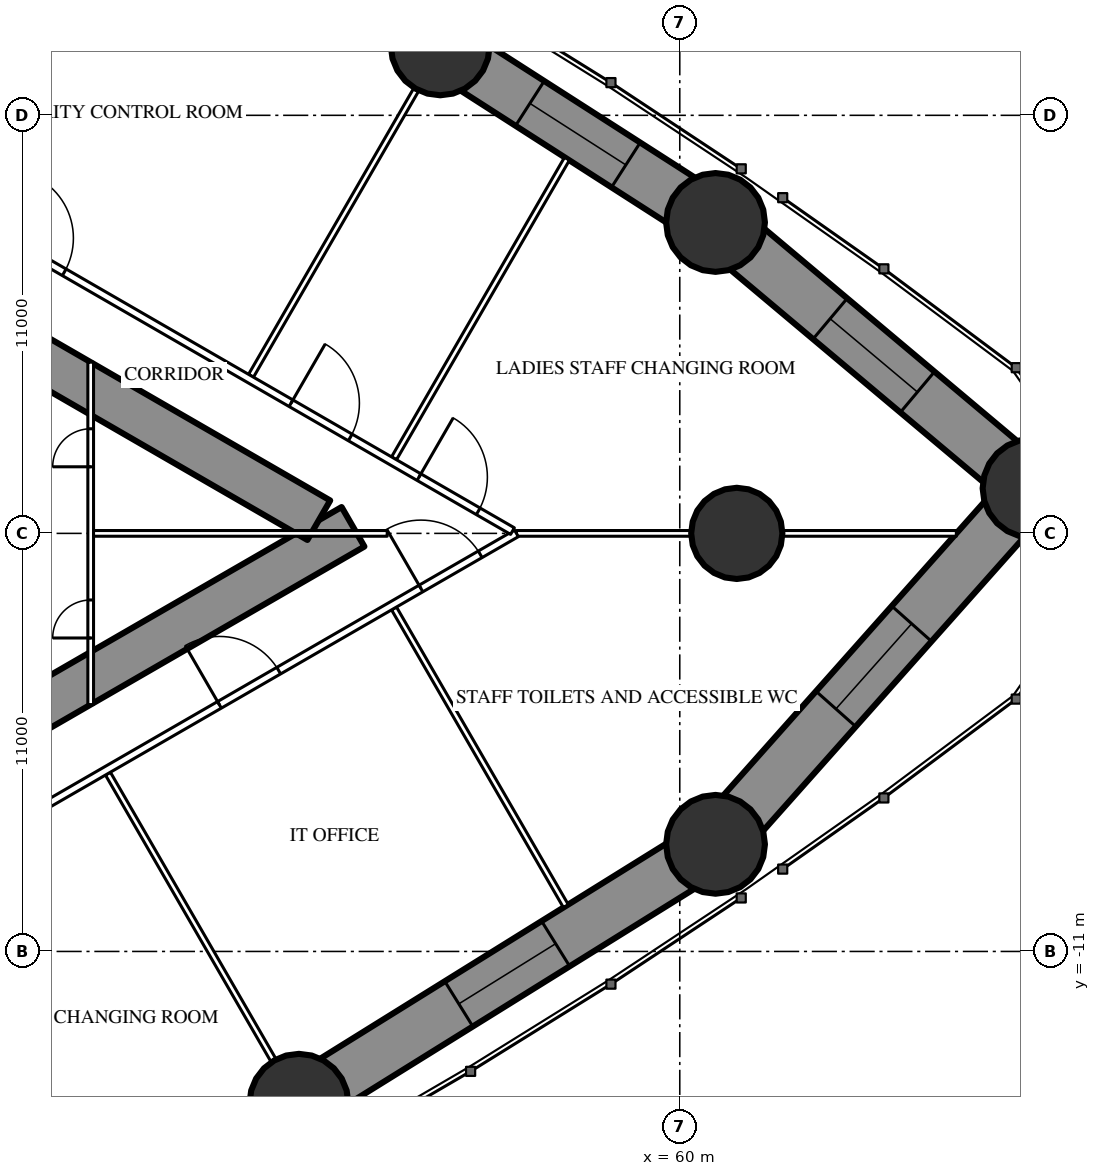
"""IFC4 building model, lengths in metres.
Left out: names, types, materials, properties, quantities, classifications, styles, units other than length and angle.
Written with IfcOpenShell. Run it as: python <this file> out.ifc"""

import sys

from ifc_helpers import new_model, si_unit, direction, frame, frame_2d, origin, origin_2d, place, context, subcontext, project, spatial, rectangle, circle, hollow_circle, extrude, element, fill, save


model = new_model("IFC4")
c1 = context("Model", 3, precision=1e-05, world=origin(), true_north=direction((0.0, 1.0)))
c2 = subcontext(c1, "Body", "Model", "MODEL_VIEW")
j1 = project(units=[si_unit("LENGTHUNIT", "METRE"), si_unit("PLANEANGLEUNIT", "RADIAN")], contexts=[c1])
p1 = place(None, origin())
s1 = spatial("IfcSite", under=j1, at=p1, CompositionType="ELEMENT")
p2 = place(p1, origin())
s2 = spatial("IfcBuilding", under=s1, at=p2, CompositionType="ELEMENT")
p3 = place(p2, frame((0.0, 0.0, 143.1)))
s3 = spatial("IfcBuildingStorey", under=s2, at=p3, CompositionType="ELEMENT", Elevation=143.1)
for number, where, z_axis, x_axis in (
    (1, (69.269, 1.187, 0.0), (0.0, 0.0, 1.0), (1.0, 0.0, 0.0)),
    (2, (60.941, 8.181, 0.0), (0.0, 0.0, 1.0), (1.0, 0.0, 0.0)),
    (3, (53.697, 12.827, 0.0), (0.0, 0.0, 1.0), (1.0, 0.0, 0.0)),
    (4, (49.979, -14.994, 0.0), (0.0, 0.0, 1.0), (1.0, 0.0, 0.0)),
    (5, (60.941, -8.181, 0.0), (0.0, 0.0, 1.0), (1.0, 0.0, 0.0)),
):
    element("IfcColumn", number, at=place(p3, frame(where, z_axis=z_axis, x_axis=x_axis)), inside=s3, PredefinedType="COLUMN", context=c2, shape_type="SweptSolid", body=[
        extrude(hollow_circle(Radius=1.3, WallThickness=0.1, at=origin_2d()), origin(), (0.0, 0.0, 1.0), 3.6),
    ])
p4 = place(p3, frame((61.5, 0.0, 0.0), z_axis=(0.0, 0.0, 1.0), x_axis=(1.0, 0.0, 0.0)))
e6 = element("IfcColumn", 6, at=p4, inside=s3, PredefinedType="COLUMN", context=c2, shape_type="SweptSolid", body=[
    extrude(circle(Radius=1.2, at=origin_2d()), origin(), (0.0, 0.0, 1.0), 3.6),
])
p5 = place(p3, frame((27.2, -13.8, 0.0), z_axis=(0.0, 0.0, 1.0), x_axis=(0.866027159892, 0.499996958321, 0.0)))
e7 = element("IfcWall", 7, at=p5, inside=s3, PredefinedType="SHEAR", context=c2, shape_type="SweptSolid", body=[
    extrude(rectangle(XDim=27.947, YDim=1.2, at=frame_2d((13.973, 0.0))), origin(), (0.0, 0.0, 1.0), 3.6),
])
p6 = place(p5, frame((4.6, 0.0, 0.0)))
e8 = element("IfcOpeningElement", 8, at=p6, cuts=e7, PredefinedType="OPENING", context=c2, shape_type="SweptSolid", body=[
    extrude(rectangle(XDim=1.0, YDim=2.2, at=frame_2d((0.5, 1.1))), frame((0.0, 0.61, 0.0), z_axis=(0.0, -1.0, 0.0), x_axis=(1.0, 0.0, 0.0)), (0.0, 0.0, 1.0), 1.22),
])
p7 = place(p5, frame((14.045, 0.0, 0.0)))
e9 = element("IfcOpeningElement", 9, at=p7, cuts=e7, PredefinedType="OPENING", context=c2, shape_type="SweptSolid", body=[
    extrude(rectangle(XDim=1.8, YDim=2.2, at=frame_2d((0.9, 1.1))), frame((0.0, 0.61, 0.0), z_axis=(0.0, -1.0, 0.0), x_axis=(1.0, 0.0, 0.0)), (0.0, 0.0, 1.0), 1.22),
])
p8 = place(p3, frame((27.2, 13.8, 0.0), z_axis=(0.0, 0.0, 1.0), x_axis=(0.866024515034, -0.500001539357, 0.0)))
e10 = element("IfcWall", 10, at=p8, inside=s3, PredefinedType="SHEAR", context=c2, shape_type="SweptSolid", body=[
    extrude(rectangle(XDim=26.907, YDim=1.2, at=frame_2d((13.454, 0.0))), origin(), (0.0, 0.0, 1.0), 3.6),
])
p9 = place(p8, frame((4.5, 0.0, 0.0)))
e11 = element("IfcOpeningElement", 11, at=p9, cuts=e10, PredefinedType="OPENING", context=c2, shape_type="SweptSolid", body=[
    extrude(rectangle(XDim=1.0, YDim=2.2, at=frame_2d((0.5, 1.1))), frame((0.0, 0.61, 0.0), z_axis=(0.0, -1.0, 0.0), x_axis=(1.0, 0.0, 0.0)), (0.0, 0.0, 1.0), 1.22),
])
p10 = place(p8, frame((12.545, 0.0, 0.0)))
e12 = element("IfcOpeningElement", 12, at=p10, cuts=e10, PredefinedType="OPENING", context=c2, shape_type="SweptSolid", body=[
    extrude(rectangle(XDim=1.8, YDim=2.2, at=frame_2d((0.9, 1.1))), frame((0.0, 0.61, 0.0), z_axis=(0.0, -1.0, 0.0), x_axis=(1.0, 0.0, 0.0)), (0.0, 0.0, 1.0), 1.22),
])
p11 = place(p3, frame((42.366, -19.007, 0.0), z_axis=(0.0, 0.0, 1.0), x_axis=(0.884632510133, 0.466288882578, 0.0)))
e13 = element("IfcWall", 13, at=p11, inside=s3, PredefinedType="SHEAR", context=c2, shape_type="SweptSolid", body=[
    extrude(rectangle(XDim=8.606, YDim=1.4, at=frame_2d((4.303, 0.0))), origin(), (0.0, 0.0, 1.0), 3.6),
])
p12 = place(p11, frame((2.803, 0.0, 0.6)))
e14 = element("IfcOpeningElement", 14, at=p12, cuts=e13, PredefinedType="OPENING", context=c2, shape_type="SweptSolid", body=[
    extrude(rectangle(XDim=3.0, YDim=1.2, at=frame_2d((1.5, 0.6))), frame((0.0, 0.71, 0.0), z_axis=(0.0, -1.0, 0.0), x_axis=(1.0, 0.0, 0.0)), (0.0, 0.0, 1.0), 1.42),
])
p13 = place(p3, frame((49.979, -14.994, 0.0), z_axis=(0.0, 0.0, 1.0), x_axis=(0.849312372751, 0.527890607505, 0.0)))
e15 = element("IfcWall", 15, at=p13, inside=s3, PredefinedType="SHEAR", context=c2, shape_type="SweptSolid", body=[
    extrude(rectangle(XDim=12.906, YDim=1.4, at=frame_2d((6.453, 0.0))), origin(), (0.0, 0.0, 1.0), 3.6),
])
p14 = place(p13, frame((4.953, 0.0, 0.6)))
e16 = element("IfcOpeningElement", 16, at=p14, cuts=e15, PredefinedType="OPENING", context=c2, shape_type="SweptSolid", body=[
    extrude(rectangle(XDim=3.0, YDim=1.2, at=frame_2d((1.5, 0.6))), frame((0.0, 0.71, 0.0), z_axis=(0.0, -1.0, 0.0), x_axis=(1.0, 0.0, 0.0)), (0.0, 0.0, 1.0), 1.42),
])
p15 = place(p3, frame((60.941, -8.181, 0.0), z_axis=(0.0, 0.0, 1.0), x_axis=(0.664421866815, 0.74735773422, 0.0)))
e17 = element("IfcWall", 17, at=p15, inside=s3, PredefinedType="SHEAR", context=c2, shape_type="SweptSolid", body=[
    extrude(rectangle(XDim=12.534, YDim=1.4, at=frame_2d((6.267, 0.0))), origin(), (0.0, 0.0, 1.0), 3.6),
])
p16 = place(p15, frame((4.767, 0.0, 0.6)))
e18 = element("IfcOpeningElement", 18, at=p16, cuts=e17, PredefinedType="OPENING", context=c2, shape_type="SweptSolid", body=[
    extrude(rectangle(XDim=3.0, YDim=1.2, at=frame_2d((1.5, 0.6))), frame((0.0, 0.71, 0.0), z_axis=(0.0, -1.0, 0.0), x_axis=(1.0, 0.0, 0.0)), (0.0, 0.0, 1.0), 1.42),
])
p17 = place(p3, frame((69.269, 1.187, 0.0), z_axis=(0.0, 0.0, 1.0), x_axis=(-0.765749969712, 0.643138386264, 0.0)))
e19 = element("IfcWall", 19, at=p17, inside=s3, PredefinedType="SHEAR", context=c2, shape_type="SweptSolid", body=[
    extrude(rectangle(XDim=10.876, YDim=1.4, at=frame_2d((5.438, 0.0))), origin(), (0.0, 0.0, 1.0), 3.6),
])
p18 = place(p17, frame((3.938, 0.0, 0.6)))
e20 = element("IfcOpeningElement", 20, at=p18, cuts=e19, PredefinedType="OPENING", context=c2, shape_type="SweptSolid", body=[
    extrude(rectangle(XDim=3.0, YDim=1.2, at=frame_2d((1.5, 0.6))), frame((0.0, 0.71, 0.0), z_axis=(0.0, -1.0, 0.0), x_axis=(1.0, 0.0, 0.0)), (0.0, 0.0, 1.0), 1.42),
])
p19 = place(p3, frame((60.941, 8.181, 0.0), z_axis=(0.0, 0.0, 1.0), x_axis=(-0.841727408736, 0.539902740669, 0.0)))
e21 = element("IfcWall", 21, at=p19, inside=s3, PredefinedType="SHEAR", context=c2, shape_type="SweptSolid", body=[
    extrude(rectangle(XDim=8.606, YDim=1.4, at=frame_2d((4.303, 0.0))), origin(), (0.0, 0.0, 1.0), 3.6),
])
p20 = place(p19, frame((2.803, 0.0, 0.6)))
e22 = element("IfcOpeningElement", 22, at=p20, cuts=e21, PredefinedType="OPENING", context=c2, shape_type="SweptSolid", body=[
    extrude(rectangle(XDim=3.0, YDim=1.2, at=frame_2d((1.5, 0.6))), frame((0.0, 0.71, 0.0), z_axis=(0.0, -1.0, 0.0), x_axis=(1.0, 0.0, 0.0)), (0.0, 0.0, 1.0), 1.42),
])
p21 = place(p3, frame((53.697, 12.827, 0.0), z_axis=(0.0, 0.0, 1.0), x_axis=(-0.87792015078, 0.478807068509, 0.0)))
e23 = element("IfcWall", 23, at=p21, inside=s3, PredefinedType="SHEAR", context=c2, shape_type="SweptSolid", body=[
    extrude(rectangle(XDim=12.906, YDim=1.4, at=frame_2d((6.453, 0.0))), origin(), (0.0, 0.0, 1.0), 3.6),
])
p22 = place(p21, frame((4.953, 0.0, 0.6)))
e24 = element("IfcOpeningElement", 24, at=p22, cuts=e23, PredefinedType="OPENING", context=c2, shape_type="SweptSolid", body=[
    extrude(rectangle(XDim=3.0, YDim=1.2, at=frame_2d((1.5, 0.6))), frame((0.0, 0.71, 0.0), z_axis=(0.0, -1.0, 0.0), x_axis=(1.0, 0.0, 0.0)), (0.0, 0.0, 1.0), 1.42),
])
p23 = place(p3, frame((44.954, -6.321, 0.0), z_axis=(0.0, 0.0, 1.0), x_axis=(0.500018676722, -0.866014620505, 0.0)))
e25 = element("IfcWall", 25, at=p23, inside=s3, PredefinedType="PARTITIONING", context=c2, shape_type="SweptSolid", body=[
    extrude(rectangle(XDim=8.704, YDim=0.15, at=frame_2d((4.352, 0.0))), origin(), (0.0, 0.0, 1.0), 2.15),
])
p24 = place(p3, frame((52.481, -1.975, 0.0), z_axis=(0.0, 0.0, 1.0), x_axis=(0.499984247144, -0.866034498509, 0.0)))
e26 = element("IfcWall", 26, at=p24, inside=s3, PredefinedType="PARTITIONING", context=c2, shape_type="SweptSolid", body=[
    extrude(rectangle(XDim=9.041, YDim=0.15, at=frame_2d((4.521, 0.0))), origin(), (0.0, 0.0, 1.0), 3.35),
])
p25 = place(p3, frame((48.719, 4.147, 0.0), z_axis=(0.0, 0.0, 1.0), x_axis=(0.499993328235, 0.866029255696, 0.0)))
e27 = element("IfcWall", 27, at=p25, inside=s3, PredefinedType="PARTITIONING", context=c2, shape_type="SweptSolid", body=[
    extrude(rectangle(XDim=8.686, YDim=0.15, at=frame_2d((4.343, 0.0))), origin(), (0.0, 0.0, 1.0), 2.15),
])
p26 = place(p3, frame((52.481, 1.975, 0.0), z_axis=(0.0, 0.0, 1.0), x_axis=(0.500008073096, 0.86602074273, 0.0)))
e28 = element("IfcWall", 28, at=p26, inside=s3, PredefinedType="PARTITIONING", context=c2, shape_type="SweptSolid", body=[
    extrude(rectangle(XDim=9.101, YDim=0.15, at=frame_2d((4.55, 0.0))), origin(), (0.0, 0.0, 1.0), 3.35),
])
p27 = place(p3, frame((55.702, 0.0, 0.0), z_axis=(0.0, 0.0, 1.0), x_axis=(1.0, 0.0, 0.0)))
e29 = element("IfcWall", 29, at=p27, inside=s3, PredefinedType="PARTITIONING", context=c2, shape_type="SweptSolid", body=[
    extrude(rectangle(XDim=11.575, YDim=0.15, at=frame_2d((5.788, 0.0))), origin(), (0.0, 0.0, 1.0), 2.15),
])
p28 = place(p3, frame((37.96, -10.243, 0.0), z_axis=(0.0, 0.0, 1.0), x_axis=(0.866026429433, 0.499998223521, 0.0)))
e30 = element("IfcWall", 30, at=p28, inside=s3, PredefinedType="PARTITIONING", context=c2, shape_type="SweptSolid", body=[
    extrude(rectangle(XDim=20.487, YDim=0.2, at=frame_2d((10.243, 0.0))), origin(), (0.0, 0.0, 1.0), 3.35),
])
p29 = place(p28, frame((11.464, 0.0, 0.0)))
e31 = element("IfcOpeningElement", 31, at=p29, cuts=e30, PredefinedType="OPENING", context=c2, shape_type="SweptSolid", body=[
    extrude(rectangle(XDim=1.8, YDim=2.2, at=frame_2d((0.9, 1.1))), frame((0.0, 0.11, 0.0), z_axis=(0.0, -1.0, 0.0), x_axis=(1.0, 0.0, 0.0)), (0.0, 0.0, 1.0), 0.22),
])
p30 = place(p28, frame((17.586, 0.0, 0.0)))
e32 = element("IfcOpeningElement", 32, at=p30, cuts=e30, PredefinedType="OPENING", context=c2, shape_type="SweptSolid", body=[
    extrude(rectangle(XDim=1.8, YDim=2.14, at=frame_2d((0.9, 1.07))), frame((0.0, 0.11, 0.0), z_axis=(0.0, -1.0, 0.0), x_axis=(1.0, 0.0, 0.0)), (0.0, 0.0, 1.0), 0.22),
])
p31 = place(p28, frame((3.221, 0.0, 0.0)))
e33 = element("IfcOpeningElement", 33, at=p31, cuts=e30, PredefinedType="OPENING", context=c2, shape_type="SweptSolid", body=[
    extrude(rectangle(XDim=1.8, YDim=2.2, at=frame_2d((0.9, 1.1))), frame((0.0, 0.11, 0.0), z_axis=(0.0, -1.0, 0.0), x_axis=(1.0, 0.0, 0.0)), (0.0, 0.0, 1.0), 0.22),
])
p32 = place(p3, frame((36.834, 10.894, 0.0), z_axis=(0.0, 0.0, 1.0), x_axis=(0.866028157229, -0.499995230863, 0.0)))
e34 = element("IfcWall", 34, at=p32, inside=s3, PredefinedType="PARTITIONING", context=c2, shape_type="SweptSolid", body=[
    extrude(rectangle(XDim=21.667, YDim=0.2, at=frame_2d((10.833, 0.0))), origin(), (0.0, 0.0, 1.0), 3.35),
])
p33 = place(p32, frame((18.826, 0.0, 0.0)))
e35 = element("IfcOpeningElement", 35, at=p33, cuts=e34, PredefinedType="OPENING", context=c2, shape_type="SweptSolid", body=[
    extrude(rectangle(XDim=1.8, YDim=2.2, at=frame_2d((0.9, 1.1))), frame((0.0, 0.11, 0.0), z_axis=(0.0, -1.0, 0.0), x_axis=(1.0, 0.0, 0.0)), (0.0, 0.0, 1.0), 0.22),
])
p34 = place(p32, frame((14.938, 0.0, 0.0)))
e36 = element("IfcOpeningElement", 36, at=p34, cuts=e34, PredefinedType="OPENING", context=c2, shape_type="SweptSolid", body=[
    extrude(rectangle(XDim=1.8, YDim=2.2, at=frame_2d((0.9, 1.1))), frame((0.0, 0.11, 0.0), z_axis=(0.0, -1.0, 0.0), x_axis=(1.0, 0.0, 0.0)), (0.0, 0.0, 1.0), 0.22),
])
p35 = place(p32, frame((6.248, 0.0, 0.0)))
e37 = element("IfcOpeningElement", 37, at=p35, cuts=e34, PredefinedType="OPENING", context=c2, shape_type="SweptSolid", body=[
    extrude(rectangle(XDim=1.8, YDim=2.2, at=frame_2d((0.9, 1.1))), frame((0.0, 0.11, 0.0), z_axis=(0.0, -1.0, 0.0), x_axis=(1.0, 0.0, 0.0)), (0.0, 0.0, 1.0), 0.22),
])
p36 = place(p3, frame((44.5, -4.505, 0.0), z_axis=(0.0, 0.0, 1.0), x_axis=(0.0, 1.0, 0.0)))
e38 = element("IfcWall", 38, at=p36, inside=s3, PredefinedType="PARTITIONING", context=c2, shape_type="SweptSolid", body=[
    extrude(rectangle(XDim=9.009, YDim=0.15, at=frame_2d((4.505, 0.0))), origin(), (0.0, 0.0, 1.0), 3.35),
])
p37 = place(p36, frame((1.752, 0.0, 0.0)))
e39 = element("IfcOpeningElement", 39, at=p37, cuts=e38, PredefinedType="OPENING", context=c2, shape_type="SweptSolid", body=[
    extrude(rectangle(XDim=1.0, YDim=2.2, at=frame_2d((0.5, 1.1))), frame((0.0, 0.085, 0.0), z_axis=(0.0, -1.0, 0.0), x_axis=(1.0, 0.0, 0.0)), (0.0, 0.0, 1.0), 0.17),
])
p38 = place(p36, frame((6.257, 0.0, 0.0)))
e40 = element("IfcOpeningElement", 40, at=p38, cuts=e38, PredefinedType="OPENING", context=c2, shape_type="SweptSolid", body=[
    extrude(rectangle(XDim=1.0, YDim=2.2, at=frame_2d((0.5, 1.1))), frame((0.0, 0.085, 0.0), z_axis=(0.0, -1.0, 0.0), x_axis=(1.0, 0.0, 0.0)), (0.0, 0.0, 1.0), 0.17),
])
p39 = place(p3, frame((44.575, 0.0, 0.0), z_axis=(0.0, 0.0, 1.0), x_axis=(1.0, 0.0, 0.0)))
e41 = element("IfcWall", 41, at=p39, inside=s3, PredefinedType="PARTITIONING", context=c2, shape_type="SweptSolid", body=[
    extrude(rectangle(XDim=7.727, YDim=0.15, at=frame_2d((3.864, 0.0))), origin(), (0.0, 0.0, 1.0), 2.15),
])
p40 = place(p14, origin())
e42 = element("IfcWindow", 42, at=p40, inside=s3, PartitioningType="SINGLE_PANEL", PredefinedType="WINDOW", context=c2, shape_type="SweptSolid", body=[
    extrude(rectangle(XDim=3.0, YDim=1.2, at=frame_2d((1.5, 0.6))), frame((0.0, 0.03, 0.0), z_axis=(0.0, -1.0, 0.0), x_axis=(1.0, 0.0, 0.0)), (0.0, 0.0, 1.0), 0.06),
])
fill(e16, e42)
p41 = place(p16, origin())
e43 = element("IfcWindow", 43, at=p41, inside=s3, PartitioningType="SINGLE_PANEL", PredefinedType="WINDOW", context=c2, shape_type="SweptSolid", body=[
    extrude(rectangle(XDim=3.0, YDim=1.2, at=frame_2d((1.5, 0.6))), frame((0.0, 0.03, 0.0), z_axis=(0.0, -1.0, 0.0), x_axis=(1.0, 0.0, 0.0)), (0.0, 0.0, 1.0), 0.06),
])
fill(e18, e43)
p42 = place(p18, origin())
e44 = element("IfcWindow", 44, at=p42, inside=s3, PartitioningType="SINGLE_PANEL", PredefinedType="WINDOW", context=c2, shape_type="SweptSolid", body=[
    extrude(rectangle(XDim=3.0, YDim=1.2, at=frame_2d((1.5, 0.6))), frame((0.0, 0.03, 0.0), z_axis=(0.0, -1.0, 0.0), x_axis=(1.0, 0.0, 0.0)), (0.0, 0.0, 1.0), 0.06),
])
fill(e20, e44)
p43 = place(p20, origin())
e45 = element("IfcWindow", 45, at=p43, inside=s3, PartitioningType="SINGLE_PANEL", PredefinedType="WINDOW", context=c2, shape_type="SweptSolid", body=[
    extrude(rectangle(XDim=3.0, YDim=1.2, at=frame_2d((1.5, 0.6))), frame((0.0, 0.03, 0.0), z_axis=(0.0, -1.0, 0.0), x_axis=(1.0, 0.0, 0.0)), (0.0, 0.0, 1.0), 0.06),
])
fill(e22, e45)
p44 = place(p29, origin())
e46 = element("IfcDoor", 46, at=p44, inside=s3, OperationType="DOUBLE_DOOR_SINGLE_SWING", PredefinedType="DOOR", context=c2, shape_type="SweptSolid", body=[
    extrude(rectangle(XDim=1.8, YDim=2.2, at=frame_2d((0.9, 1.1))), frame((0.0, 0.025, 0.0), z_axis=(0.0, -1.0, 0.0), x_axis=(1.0, 0.0, 0.0)), (0.0, 0.0, 1.0), 0.05),
])
fill(e31, e46)
p45 = place(p30, origin())
e47 = element("IfcDoor", 47, at=p45, inside=s3, OperationType="DOUBLE_DOOR_SINGLE_SWING", PredefinedType="DOOR", context=c2, shape_type="SweptSolid", body=[
    extrude(rectangle(XDim=1.8, YDim=2.14, at=frame_2d((0.9, 1.07))), frame((0.0, 0.025, 0.0), z_axis=(0.0, -1.0, 0.0), x_axis=(1.0, 0.0, 0.0)), (0.0, 0.0, 1.0), 0.05),
])
fill(e32, e47)
p46 = place(p33, origin())
e48 = element("IfcDoor", 48, at=p46, inside=s3, OperationType="DOUBLE_DOOR_SINGLE_SWING", PredefinedType="DOOR", context=c2, shape_type="SweptSolid", body=[
    extrude(rectangle(XDim=1.8, YDim=2.2, at=frame_2d((0.9, 1.1))), frame((0.0, 0.025, 0.0), z_axis=(0.0, -1.0, 0.0), x_axis=(1.0, 0.0, 0.0)), (0.0, 0.0, 1.0), 0.05),
])
fill(e35, e48)
p47 = place(p34, origin())
e49 = element("IfcDoor", 49, at=p47, inside=s3, OperationType="DOUBLE_DOOR_SINGLE_SWING", PredefinedType="DOOR", context=c2, shape_type="SweptSolid", body=[
    extrude(rectangle(XDim=1.8, YDim=2.2, at=frame_2d((0.9, 1.1))), frame((0.0, 0.025, 0.0), z_axis=(0.0, -1.0, 0.0), x_axis=(1.0, 0.0, 0.0)), (0.0, 0.0, 1.0), 0.05),
])
fill(e36, e49)
p48 = place(p35, origin())
e50 = element("IfcDoor", 50, at=p48, inside=s3, OperationType="DOUBLE_DOOR_SINGLE_SWING", PredefinedType="DOOR", context=c2, shape_type="SweptSolid", body=[
    extrude(rectangle(XDim=1.8, YDim=2.2, at=frame_2d((0.9, 1.1))), frame((0.0, 0.025, 0.0), z_axis=(0.0, -1.0, 0.0), x_axis=(1.0, 0.0, 0.0)), (0.0, 0.0, 1.0), 0.05),
])
fill(e37, e50)
p49 = place(p37, origin())
e51 = element("IfcDoor", 51, at=p49, inside=s3, OperationType="SINGLE_SWING_LEFT", PredefinedType="DOOR", context=c2, shape_type="SweptSolid", body=[
    extrude(rectangle(XDim=1.0, YDim=2.2, at=frame_2d((0.5, 1.1))), frame((0.0, 0.025, 0.0), z_axis=(0.0, -1.0, 0.0), x_axis=(1.0, 0.0, 0.0)), (0.0, 0.0, 1.0), 0.05),
])
fill(e39, e51)
p50 = place(p38, origin())
e52 = element("IfcDoor", 52, at=p50, inside=s3, OperationType="SINGLE_SWING_LEFT", PredefinedType="DOOR", context=c2, shape_type="SweptSolid", body=[
    extrude(rectangle(XDim=1.0, YDim=2.2, at=frame_2d((0.5, 1.1))), frame((0.0, 0.025, 0.0), z_axis=(0.0, -1.0, 0.0), x_axis=(1.0, 0.0, 0.0)), (0.0, 0.0, 1.0), 0.05),
])
fill(e40, e52)
save(model, sys.argv[1])
